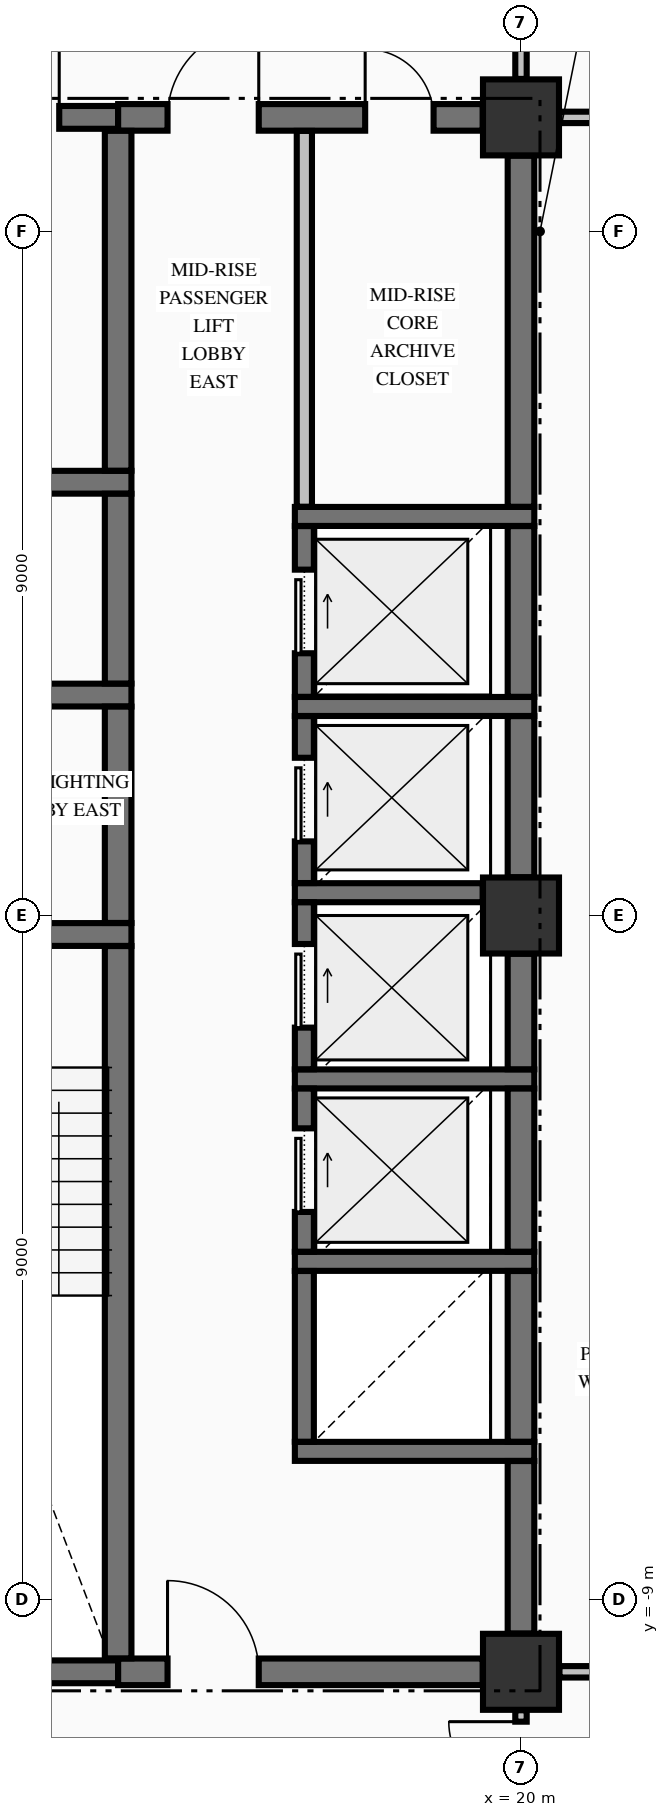
"""IFC4 building model, lengths in metres.
Left out: names, types, materials, properties, quantities, classifications, styles, units other than length and angle.
Written with IfcOpenShell. Run it as: python <this file> out.ifc"""

import sys

from ifc_helpers import new_model, si_unit, direction, frame, frame_2d, origin, origin_2d, place, context, subcontext, project, spatial, rectangle, extrude, element, fill, save


model = new_model("IFC4")
c1 = context("Model", 3, precision=1e-05, world=origin(), true_north=direction((0.0, 1.0)))
c2 = subcontext(c1, "Body", "Model", "MODEL_VIEW")
j1 = project(units=[si_unit("LENGTHUNIT", "METRE"), si_unit("PLANEANGLEUNIT", "RADIAN")], contexts=[c1])
p1 = place(None, origin())
s1 = spatial("IfcSite", under=j1, at=p1, CompositionType="ELEMENT")
p2 = place(p1, origin())
s2 = spatial("IfcBuilding", under=s1, at=p2, CompositionType="ELEMENT")
p3 = place(p2, frame((0.0, 0.0, 121.35)))
s3 = spatial("IfcBuildingStorey", under=s2, at=p3, CompositionType="ELEMENT", Elevation=121.35)
for number, where, z_axis, x_axis in (
    (1, (20.0, -9.95, -0.425), (0.0, 0.0, 1.0), (1.0, 0.0, 0.0)),
    (2, (20.0, 10.5, -0.425), (0.0, 0.0, 1.0), (1.0, 0.0, 0.0)),
    (3, (20.0, 0.0, -0.425), (0.0, 0.0, 1.0), (1.0, 0.0, 0.0)),
):
    element("IfcColumn", number, at=place(p3, frame(where, z_axis=z_axis, x_axis=x_axis)), inside=s3, PredefinedType="COLUMN", context=c2, shape_type="SweptSolid", body=[
        extrude(rectangle(XDim=1.0, YDim=1.0, at=origin_2d()), origin(), (0.0, 0.0, 1.0), 3.745),
    ])
p4 = place(p3, frame((11.504, -9.95, 0.0), z_axis=(0.0, 0.0, 1.0), x_axis=(1.0, 0.0, 0.0)))
e4 = element("IfcWall", 4, at=p4, inside=s3, PredefinedType="SHEAR", context=c2, shape_type="SweptSolid", body=[
    extrude(rectangle(XDim=3.196, YDim=0.3, at=frame_2d((1.598, 0.0))), origin(), (0.0, 0.0, 1.0), 3.32),
])
p5 = place(p3, frame((14.7, -9.95, 0.0), z_axis=(0.0, 0.0, 1.0), x_axis=(1.0, 0.0, 0.0)))
e5 = element("IfcWall", 5, at=p5, inside=s3, PredefinedType="SHEAR", context=c2, shape_type="SweptSolid", body=[
    extrude(rectangle(XDim=4.796, YDim=0.35, at=frame_2d((2.398, 0.0))), origin(), (0.0, 0.0, 1.0), 3.32),
])
p6 = place(p5, frame((0.65, 0.0, 0.0)))
e6 = element("IfcOpeningElement", 6, at=p6, cuts=e5, PredefinedType="OPENING", context=c2, shape_type="SweptSolid", body=[
    extrude(rectangle(XDim=1.2, YDim=2.15, at=frame_2d((0.6, 1.075))), frame((0.0, 0.185, 0.0), z_axis=(0.0, -1.0, 0.0), x_axis=(1.0, 0.0, 0.0)), (0.0, 0.0, 1.0), 0.37),
])
for number, where, z_axis, x_axis in (
    (7, (17.025, -7.05, 0.0), (0.0, 0.0, 1.0), (1.0, 0.0, 0.0)),
    (8, (17.025, -4.55, 0.0), (0.0, 0.0, 1.0), (1.0, 0.0, 0.0)),
    (9, (17.025, -2.15, 0.0), (0.0, 0.0, 1.0), (1.0, 0.0, 0.0)),
):
    element("IfcWall", number, at=place(p3, frame(where, z_axis=z_axis, x_axis=x_axis)), inside=s3, PredefinedType="SOLIDWALL", context=c2, shape_type="SweptSolid", body=[
        extrude(rectangle(XDim=3.15, YDim=0.25, at=frame_2d((1.575, 0.0))), origin(), (0.0, 0.0, 1.0), 3.32),
    ])
p7 = place(p3, frame((11.504, -0.25, 0.0), z_axis=(0.0, 0.0, 1.0), x_axis=(1.0, 0.0, 0.0)))
e10 = element("IfcWall", 10, at=p7, inside=s3, PredefinedType="SHEAR", context=c2, shape_type="SweptSolid", body=[
    extrude(rectangle(XDim=3.371, YDim=0.3, at=frame_2d((1.686, 0.0))), origin(), (0.0, 0.0, 1.0), 3.32),
])
p8 = place(p7, frame((1.096, 0.0, 0.0)))
e11 = element("IfcOpeningElement", 11, at=p8, cuts=e10, PredefinedType="OPENING", context=c2, shape_type="SweptSolid", body=[
    extrude(rectangle(XDim=1.1, YDim=2.15, at=frame_2d((0.55, 1.075))), frame((0.0, 0.16, 0.0), z_axis=(0.0, -1.0, 0.0), x_axis=(1.0, 0.0, 0.0)), (0.0, 0.0, 1.0), 0.32),
])
p9 = place(p3, frame((17.025, 0.3, 0.0), z_axis=(0.0, 0.0, 1.0), x_axis=(1.0, 0.0, 0.0)))
e12 = element("IfcWall", 12, at=p9, inside=s3, PredefinedType="SOLIDWALL", context=c2, shape_type="SweptSolid", body=[
    extrude(rectangle(XDim=2.471, YDim=0.25, at=frame_2d((1.236, 0.0))), origin(), (0.0, 0.0, 1.0), 3.32),
])
p10 = place(p3, frame((17.025, 2.75, 0.0), z_axis=(0.0, 0.0, 1.0), x_axis=(1.0, 0.0, 0.0)))
e13 = element("IfcWall", 13, at=p10, inside=s3, PredefinedType="SOLIDWALL", context=c2, shape_type="SweptSolid", body=[
    extrude(rectangle(XDim=3.15, YDim=0.25, at=frame_2d((1.575, 0.0))), origin(), (0.0, 0.0, 1.0), 3.32),
])
p11 = place(p3, frame((10.85, 2.9, 0.0), z_axis=(0.0, 0.0, 1.0), x_axis=(1.0, 0.0, 0.0)))
e14 = element("IfcWall", 14, at=p11, inside=s3, PredefinedType="SHEAR", context=c2, shape_type="SweptSolid", body=[
    extrude(rectangle(XDim=4.025, YDim=0.3, at=frame_2d((2.012, 0.0))), origin(), (0.0, 0.0, 1.0), 3.32),
])
p12 = place(p11, frame((0.85, 0.0, 0.0)))
e15 = element("IfcOpeningElement", 15, at=p12, cuts=e14, PredefinedType="OPENING", context=c2, shape_type="SweptSolid", body=[
    extrude(rectangle(XDim=1.1, YDim=2.2, at=frame_2d((0.55, 1.1))), frame((0.0, 0.16, 0.0), z_axis=(0.0, -1.0, 0.0), x_axis=(1.0, 0.0, 0.0)), (0.0, 0.0, 1.0), 0.32),
])
p13 = place(p3, frame((17.025, 5.25, 0.0), z_axis=(0.0, 0.0, 1.0), x_axis=(1.0, 0.0, 0.0)))
e16 = element("IfcWall", 16, at=p13, inside=s3, PredefinedType="SOLIDWALL", context=c2, shape_type="SweptSolid", body=[
    extrude(rectangle(XDim=3.15, YDim=0.25, at=frame_2d((1.575, 0.0))), origin(), (0.0, 0.0, 1.0), 3.32),
])
p14 = place(p3, frame((10.85, 5.7, 0.0), z_axis=(0.0, 0.0, 1.0), x_axis=(1.0, 0.0, 0.0)))
e17 = element("IfcWall", 17, at=p14, inside=s3, PredefinedType="SHEAR", context=c2, shape_type="SweptSolid", body=[
    extrude(rectangle(XDim=4.025, YDim=0.3, at=frame_2d((2.012, 0.0))), origin(), (0.0, 0.0, 1.0), 3.32),
])
p15 = place(p3, frame((11.504, 10.5, 0.0), z_axis=(0.0, 0.0, 1.0), x_axis=(1.0, 0.0, 0.0)))
e18 = element("IfcWall", 18, at=p15, inside=s3, PredefinedType="SHEAR", context=c2, shape_type="SweptSolid", body=[
    extrude(rectangle(XDim=3.196, YDim=0.3, at=frame_2d((1.598, 0.0))), origin(), (0.0, 0.0, 1.0), 3.32),
])
p16 = place(p15, frame((1.471, 0.0, 0.0)))
e19 = element("IfcOpeningElement", 19, at=p16, cuts=e18, PredefinedType="OPENING", context=c2, shape_type="SweptSolid", body=[
    extrude(rectangle(XDim=0.95, YDim=2.15, at=frame_2d((0.475, 1.075))), frame((0.0, 0.16, 0.0), z_axis=(0.0, -1.0, 0.0), x_axis=(1.0, 0.0, 0.0)), (0.0, 0.0, 1.0), 0.32),
])
p17 = place(p3, frame((14.7, 10.5, 0.0), z_axis=(0.0, 0.0, 1.0), x_axis=(1.0, 0.0, 0.0)))
e20 = element("IfcWall", 20, at=p17, inside=s3, PredefinedType="SHEAR", context=c2, shape_type="SweptSolid", body=[
    extrude(rectangle(XDim=4.796, YDim=0.35, at=frame_2d((2.398, 0.0))), origin(), (0.0, 0.0, 1.0), 3.32),
])
p18 = place(p17, frame((0.65, 0.0, 0.0)))
e21 = element("IfcOpeningElement", 21, at=p18, cuts=e20, PredefinedType="OPENING", context=c2, shape_type="SweptSolid", body=[
    extrude(rectangle(XDim=1.2, YDim=2.15, at=frame_2d((0.6, 1.075))), frame((0.0, 0.185, 0.0), z_axis=(0.0, -1.0, 0.0), x_axis=(1.0, 0.0, 0.0)), (0.0, 0.0, 1.0), 0.37),
])
p19 = place(p17, frame((3.25, 0.0, 0.0)))
e22 = element("IfcOpeningElement", 22, at=p19, cuts=e20, PredefinedType="OPENING", context=c2, shape_type="SweptSolid", body=[
    extrude(rectangle(XDim=0.9, YDim=2.15, at=frame_2d((0.45, 1.075))), frame((0.0, 0.185, 0.0), z_axis=(0.0, -1.0, 0.0), x_axis=(1.0, 0.0, 0.0)), (0.0, 0.0, 1.0), 0.37),
])
p20 = place(p3, frame((20.506, -9.95, 0.0), z_axis=(0.0, 0.0, 1.0), x_axis=(1.0, 0.0, 0.0)))
e23 = element("IfcWall", 23, at=p20, inside=s3, PredefinedType="PARTITIONING", context=c2, shape_type="SweptSolid", body=[
    extrude(rectangle(XDim=2.329, YDim=0.15, at=frame_2d((1.165, 0.0))), origin(), (0.0, 0.0, 1.0), 3.32),
])
p21 = place(p20, frame((0.494, 0.0, 0.0)))
e24 = element("IfcOpeningElement", 24, at=p21, cuts=e23, PredefinedType="OPENING", context=c2, shape_type="SweptSolid", body=[
    extrude(rectangle(XDim=1.0, YDim=2.15, at=frame_2d((0.5, 1.075))), frame((0.0, 0.085, 0.0), z_axis=(0.0, -1.0, 0.0), x_axis=(1.0, 0.0, 0.0)), (0.0, 0.0, 1.0), 0.17),
])
p22 = place(p3, frame((20.506, 10.5, 0.0), z_axis=(0.0, 0.0, 1.0), x_axis=(1.0, 0.0, 0.0)))
e25 = element("IfcWall", 25, at=p22, inside=s3, PredefinedType="PARTITIONING", context=c2, shape_type="SweptSolid", body=[
    extrude(rectangle(XDim=2.329, YDim=0.15, at=frame_2d((1.165, 0.0))), origin(), (0.0, 0.0, 1.0), 3.32),
])
p23 = place(p22, frame((0.494, 0.0, 0.0)))
e26 = element("IfcOpeningElement", 26, at=p23, cuts=e25, PredefinedType="OPENING", context=c2, shape_type="SweptSolid", body=[
    extrude(rectangle(XDim=1.0, YDim=2.15, at=frame_2d((0.5, 1.075))), frame((0.0, 0.085, 0.0), z_axis=(0.0, -1.0, 0.0), x_axis=(1.0, 0.0, 0.0)), (0.0, 0.0, 1.0), 0.17),
])
p24 = place(p3, frame((14.7, -9.773, 0.0), z_axis=(0.0, 0.0, 1.0), x_axis=(0.0, 1.0, 0.0)))
e27 = element("IfcWall", 27, at=p24, inside=s3, PredefinedType="SHEAR", context=c2, shape_type="SweptSolid", body=[
    extrude(rectangle(XDim=9.371, YDim=0.35, at=frame_2d((4.686, 0.0))), origin(), (0.0, 0.0, 1.0), 3.32),
])
p25 = place(p3, frame((14.7, -0.098, 0.0), z_axis=(0.0, 0.0, 1.0), x_axis=(0.0, 1.0, 0.0)))
e28 = element("IfcWall", 28, at=p25, inside=s3, PredefinedType="SHEAR", context=c2, shape_type="SweptSolid", body=[
    extrude(rectangle(XDim=2.846, YDim=0.35, at=frame_2d((1.423, 0.0))), origin(), (0.0, 0.0, 1.0), 3.32),
])
p26 = place(p3, frame((14.7, 3.052, 0.0), z_axis=(0.0, 0.0, 1.0), x_axis=(0.0, 1.0, 0.0)))
e29 = element("IfcWall", 29, at=p26, inside=s3, PredefinedType="SHEAR", context=c2, shape_type="SweptSolid", body=[
    extrude(rectangle(XDim=2.496, YDim=0.35, at=frame_2d((1.248, 0.0))), origin(), (0.0, 0.0, 1.0), 3.32),
])
p27 = place(p3, frame((14.7, 5.852, 0.0), z_axis=(0.0, 0.0, 1.0), x_axis=(0.0, 1.0, 0.0)))
e30 = element("IfcWall", 30, at=p27, inside=s3, PredefinedType="SHEAR", context=c2, shape_type="SweptSolid", body=[
    extrude(rectangle(XDim=4.471, YDim=0.35, at=frame_2d((2.235, 0.0))), origin(), (0.0, 0.0, 1.0), 3.32),
])
p28 = place(p3, frame((17.15, -6.923, 0.0), z_axis=(0.0, 0.0, 1.0), x_axis=(0.0, 1.0, 0.0)))
e31 = element("IfcWall", 31, at=p28, inside=s3, PredefinedType="SOLIDWALL", context=c2, shape_type="SweptSolid", body=[
    extrude(rectangle(XDim=2.246, YDim=0.25, at=frame_2d((1.123, 0.0))), origin(), (0.0, 0.0, 1.0), 3.32),
])
p29 = place(p3, frame((17.15, -4.423, 0.0), z_axis=(0.0, 0.0, 1.0), x_axis=(0.0, 1.0, 0.0)))
e32 = element("IfcWall", 32, at=p29, inside=s3, PredefinedType="SOLIDWALL", context=c2, shape_type="SweptSolid", body=[
    extrude(rectangle(XDim=2.146, YDim=0.25, at=frame_2d((1.073, 0.0))), origin(), (0.0, 0.0, 1.0), 3.32),
])
p30 = place(p29, frame((0.523, 0.0, 0.0)))
e33 = element("IfcOpeningElement", 33, at=p30, cuts=e32, PredefinedType="OPENING", context=c2, shape_type="SweptSolid", body=[
    extrude(rectangle(XDim=1.1, YDim=2.2, at=frame_2d((0.55, 1.1))), frame((0.0, 0.135, 0.0), z_axis=(0.0, -1.0, 0.0), x_axis=(1.0, 0.0, 0.0)), (0.0, 0.0, 1.0), 0.27),
])
p31 = place(p3, frame((17.15, -2.023, 0.0), z_axis=(0.0, 0.0, 1.0), x_axis=(0.0, 1.0, 0.0)))
e34 = element("IfcWall", 34, at=p31, inside=s3, PredefinedType="SOLIDWALL", context=c2, shape_type="SweptSolid", body=[
    extrude(rectangle(XDim=2.196, YDim=0.25, at=frame_2d((1.098, 0.0))), origin(), (0.0, 0.0, 1.0), 3.32),
])
p32 = place(p31, frame((0.548, 0.0, 0.0)))
e35 = element("IfcOpeningElement", 35, at=p32, cuts=e34, PredefinedType="OPENING", context=c2, shape_type="SweptSolid", body=[
    extrude(rectangle(XDim=1.1, YDim=2.2, at=frame_2d((0.55, 1.1))), frame((0.0, 0.135, 0.0), z_axis=(0.0, -1.0, 0.0), x_axis=(1.0, 0.0, 0.0)), (0.0, 0.0, 1.0), 0.27),
])
p33 = place(p3, frame((17.15, 0.427, 0.0), z_axis=(0.0, 0.0, 1.0), x_axis=(0.0, 1.0, 0.0)))
e36 = element("IfcWall", 36, at=p33, inside=s3, PredefinedType="SOLIDWALL", context=c2, shape_type="SweptSolid", body=[
    extrude(rectangle(XDim=2.196, YDim=0.25, at=frame_2d((1.098, 0.0))), origin(), (0.0, 0.0, 1.0), 3.32),
])
p34 = place(p33, frame((0.548, 0.0, 0.0)))
e37 = element("IfcOpeningElement", 37, at=p34, cuts=e36, PredefinedType="OPENING", context=c2, shape_type="SweptSolid", body=[
    extrude(rectangle(XDim=1.1, YDim=2.2, at=frame_2d((0.55, 1.1))), frame((0.0, 0.135, 0.0), z_axis=(0.0, -1.0, 0.0), x_axis=(1.0, 0.0, 0.0)), (0.0, 0.0, 1.0), 0.27),
])
p35 = place(p3, frame((17.15, 2.877, 0.0), z_axis=(0.0, 0.0, 1.0), x_axis=(0.0, 1.0, 0.0)))
e38 = element("IfcWall", 38, at=p35, inside=s3, PredefinedType="SOLIDWALL", context=c2, shape_type="SweptSolid", body=[
    extrude(rectangle(XDim=2.246, YDim=0.25, at=frame_2d((1.123, 0.0))), origin(), (0.0, 0.0, 1.0), 3.32),
])
p36 = place(p35, frame((0.573, 0.0, 0.0)))
e39 = element("IfcOpeningElement", 39, at=p36, cuts=e38, PredefinedType="OPENING", context=c2, shape_type="SweptSolid", body=[
    extrude(rectangle(XDim=1.1, YDim=2.2, at=frame_2d((0.55, 1.1))), frame((0.0, 0.135, 0.0), z_axis=(0.0, -1.0, 0.0), x_axis=(1.0, 0.0, 0.0)), (0.0, 0.0, 1.0), 0.27),
])
p37 = place(p3, frame((20.0, -9.446, 0.0), z_axis=(0.0, 0.0, 1.0), x_axis=(0.0, 1.0, 0.0)))
e40 = element("IfcWall", 40, at=p37, inside=s3, PredefinedType="SHEAR", context=c2, shape_type="SweptSolid", body=[
    extrude(rectangle(XDim=2.269, YDim=0.35, at=frame_2d((1.135, 0.0))), origin(), (0.0, 0.0, 1.0), 3.32),
])
p38 = place(p3, frame((20.0, -6.923, 0.0), z_axis=(0.0, 0.0, 1.0), x_axis=(0.0, 1.0, 0.0)))
e41 = element("IfcWall", 41, at=p38, inside=s3, PredefinedType="SHEAR", context=c2, shape_type="SweptSolid", body=[
    extrude(rectangle(XDim=2.246, YDim=0.35, at=frame_2d((1.123, 0.0))), origin(), (0.0, 0.0, 1.0), 3.32),
])
p39 = place(p3, frame((20.0, -4.423, 0.0), z_axis=(0.0, 0.0, 1.0), x_axis=(0.0, 1.0, 0.0)))
e42 = element("IfcWall", 42, at=p39, inside=s3, PredefinedType="SHEAR", context=c2, shape_type="SweptSolid", body=[
    extrude(rectangle(XDim=2.146, YDim=0.35, at=frame_2d((1.073, 0.0))), origin(), (0.0, 0.0, 1.0), 3.32),
])
p40 = place(p3, frame((20.0, -2.023, 0.0), z_axis=(0.0, 0.0, 1.0), x_axis=(0.0, 1.0, 0.0)))
e43 = element("IfcWall", 43, at=p40, inside=s3, PredefinedType="SHEAR", context=c2, shape_type="SweptSolid", body=[
    extrude(rectangle(XDim=1.519, YDim=0.35, at=frame_2d((0.76, 0.0))), origin(), (0.0, 0.0, 1.0), 3.32),
])
p41 = place(p3, frame((20.0, 0.504, 0.0), z_axis=(0.0, 0.0, 1.0), x_axis=(0.0, 1.0, 0.0)))
e44 = element("IfcWall", 44, at=p41, inside=s3, PredefinedType="SHEAR", context=c2, shape_type="SweptSolid", body=[
    extrude(rectangle(XDim=2.119, YDim=0.35, at=frame_2d((1.06, 0.0))), origin(), (0.0, 0.0, 1.0), 3.32),
])
p42 = place(p3, frame((20.0, 2.877, 0.0), z_axis=(0.0, 0.0, 1.0), x_axis=(0.0, 1.0, 0.0)))
e45 = element("IfcWall", 45, at=p42, inside=s3, PredefinedType="SHEAR", context=c2, shape_type="SweptSolid", body=[
    extrude(rectangle(XDim=2.246, YDim=0.35, at=frame_2d((1.123, 0.0))), origin(), (0.0, 0.0, 1.0), 3.32),
])
p43 = place(p3, frame((20.0, 5.377, 0.0), z_axis=(0.0, 0.0, 1.0), x_axis=(0.0, 1.0, 0.0)))
e46 = element("IfcWall", 46, at=p43, inside=s3, PredefinedType="SHEAR", context=c2, shape_type="SweptSolid", body=[
    extrude(rectangle(XDim=4.619, YDim=0.35, at=frame_2d((2.31, 0.0))), origin(), (0.0, 0.0, 1.0), 3.32),
])
p44 = place(p3, frame((17.15, 5.378, 0.0), z_axis=(0.0, 0.0, 1.0), x_axis=(0.0, 1.0, 0.0)))
e47 = element("IfcWall", 47, at=p44, inside=s3, PredefinedType="PARTITIONING", context=c2, shape_type="SweptSolid", body=[
    extrude(rectangle(XDim=4.944, YDim=0.2, at=frame_2d((2.472, 0.0))), origin(), (0.0, 0.0, 1.0), 3.32),
])
p45 = place(p3, frame((20.0, -12.122, 0.0), z_axis=(0.0, 0.0, 1.0), x_axis=(0.0, 1.0, 0.0)))
e48 = element("IfcWall", 48, at=p45, inside=s3, PredefinedType="PARTITIONING", context=c2, shape_type="SweptSolid", body=[
    extrude(rectangle(XDim=1.666, YDim=0.15, at=frame_2d((0.833, 0.0))), origin(), (0.0, 0.0, 1.0), 2.81),
])
p46 = place(p45, frame((0.566, 0.0, 0.0)))
e49 = element("IfcOpeningElement", 49, at=p46, cuts=e48, PredefinedType="OPENING", context=c2, shape_type="SweptSolid", body=[
    extrude(rectangle(XDim=0.95, YDim=2.15, at=frame_2d((0.475, 1.075))), frame((0.0, 0.085, 0.0), z_axis=(0.0, -1.0, 0.0), x_axis=(1.0, 0.0, 0.0)), (0.0, 0.0, 1.0), 0.17),
])
p47 = place(p3, frame((20.0, 11.006, 0.0), z_axis=(0.0, 0.0, 1.0), x_axis=(0.0, 1.0, 0.0)))
e50 = element("IfcWall", 50, at=p47, inside=s3, PredefinedType="PARTITIONING", context=c2, shape_type="SweptSolid", body=[
    extrude(rectangle(XDim=2.466, YDim=0.15, at=frame_2d((1.233, 0.0))), origin(), (0.0, 0.0, 1.0), 2.81),
])
p48 = place(p47, frame((0.549, 0.0, 0.0)))
e51 = element("IfcOpeningElement", 51, at=p48, cuts=e50, PredefinedType="OPENING", context=c2, shape_type="SweptSolid", body=[
    extrude(rectangle(XDim=0.95, YDim=2.15, at=frame_2d((0.475, 1.075))), frame((0.0, 0.085, 0.0), z_axis=(0.0, -1.0, 0.0), x_axis=(1.0, 0.0, 0.0)), (0.0, 0.0, 1.0), 0.17),
])
p49 = place(p16, origin())
e52 = element("IfcDoor", 52, at=p49, inside=s3, OperationType="SINGLE_SWING_RIGHT", PredefinedType="DOOR", context=c2, shape_type="SweptSolid", body=[
    extrude(rectangle(XDim=0.95, YDim=2.15, at=frame_2d((0.475, 1.075))), frame((0.0, 0.025, 0.0), z_axis=(0.0, -1.0, 0.0), x_axis=(1.0, 0.0, 0.0)), (0.0, 0.0, 1.0), 0.05),
])
fill(e19, e52)
p50 = place(p30, origin())
e53 = element("IfcDoor", 53, at=p50, inside=s3, OperationType="SLIDING_TO_RIGHT", PredefinedType="DOOR", context=c2, shape_type="SweptSolid", body=[
    extrude(rectangle(XDim=1.1, YDim=2.2, at=frame_2d((0.55, 1.1))), frame((0.0, 0.025, 0.0), z_axis=(0.0, -1.0, 0.0), x_axis=(1.0, 0.0, 0.0)), (0.0, 0.0, 1.0), 0.05),
])
fill(e33, e53)
p51 = place(p32, origin())
e54 = element("IfcDoor", 54, at=p51, inside=s3, OperationType="SLIDING_TO_RIGHT", PredefinedType="DOOR", context=c2, shape_type="SweptSolid", body=[
    extrude(rectangle(XDim=1.1, YDim=2.2, at=frame_2d((0.55, 1.1))), frame((0.0, 0.025, 0.0), z_axis=(0.0, -1.0, 0.0), x_axis=(1.0, 0.0, 0.0)), (0.0, 0.0, 1.0), 0.05),
])
fill(e35, e54)
p52 = place(p34, origin())
e55 = element("IfcDoor", 55, at=p52, inside=s3, OperationType="SLIDING_TO_RIGHT", PredefinedType="DOOR", context=c2, shape_type="SweptSolid", body=[
    extrude(rectangle(XDim=1.1, YDim=2.2, at=frame_2d((0.55, 1.1))), frame((0.0, 0.025, 0.0), z_axis=(0.0, -1.0, 0.0), x_axis=(1.0, 0.0, 0.0)), (0.0, 0.0, 1.0), 0.05),
])
fill(e37, e55)
p53 = place(p36, origin())
e56 = element("IfcDoor", 56, at=p53, inside=s3, OperationType="SLIDING_TO_RIGHT", PredefinedType="DOOR", context=c2, shape_type="SweptSolid", body=[
    extrude(rectangle(XDim=1.1, YDim=2.2, at=frame_2d((0.55, 1.1))), frame((0.0, 0.025, 0.0), z_axis=(0.0, -1.0, 0.0), x_axis=(1.0, 0.0, 0.0)), (0.0, 0.0, 1.0), 0.05),
])
fill(e39, e56)
p54 = place(p6, origin())
e57 = element("IfcDoor", 57, at=p54, inside=s3, OperationType="SINGLE_SWING_LEFT", PredefinedType="DOOR", context=c2, shape_type="SweptSolid", body=[
    extrude(rectangle(XDim=1.2, YDim=2.15, at=frame_2d((0.6, 1.075))), frame((0.0, 0.025, 0.0), z_axis=(0.0, -1.0, 0.0), x_axis=(1.0, 0.0, 0.0)), (0.0, 0.0, 1.0), 0.05),
])
fill(e6, e57)
p55 = place(p18, origin())
e58 = element("IfcDoor", 58, at=p55, inside=s3, OperationType="SINGLE_SWING_RIGHT", PredefinedType="DOOR", context=c2, shape_type="SweptSolid", body=[
    extrude(rectangle(XDim=1.2, YDim=2.15, at=frame_2d((0.6, 1.075))), frame((0.0, 0.025, 0.0), z_axis=(0.0, -1.0, 0.0), x_axis=(1.0, 0.0, 0.0)), (0.0, 0.0, 1.0), 0.05),
])
fill(e21, e58)
p56 = place(p19, origin())
e59 = element("IfcDoor", 59, at=p56, inside=s3, OperationType="SINGLE_SWING_LEFT", PredefinedType="DOOR", context=c2, shape_type="SweptSolid", body=[
    extrude(rectangle(XDim=0.9, YDim=2.15, at=frame_2d((0.45, 1.075))), frame((0.0, 0.025, 0.0), z_axis=(0.0, -1.0, 0.0), x_axis=(1.0, 0.0, 0.0)), (0.0, 0.0, 1.0), 0.05),
])
fill(e22, e59)
p57 = place(p46, origin())
e60 = element("IfcDoor", 60, at=p57, inside=s3, OperationType="SINGLE_SWING_RIGHT", PredefinedType="DOOR", context=c2, shape_type="SweptSolid", body=[
    extrude(rectangle(XDim=0.95, YDim=2.15, at=frame_2d((0.475, 1.075))), frame((0.0, 0.025, 0.0), z_axis=(0.0, -1.0, 0.0), x_axis=(1.0, 0.0, 0.0)), (0.0, 0.0, 1.0), 0.05),
])
fill(e49, e60)
save(model, sys.argv[1])
